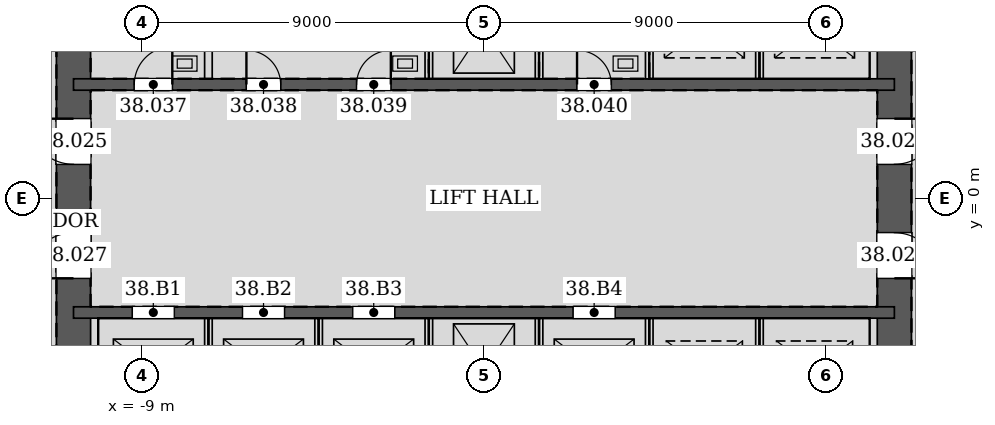
"""IFC4 building model, lengths in metres.
Left out: names, types, materials, properties, quantities, classifications, styles, units other than length and angle.
Written with IfcOpenShell. Run it as: python <this file> out.ifc"""

import sys

from ifc_helpers import new_model, si_unit, direction, frame, frame_2d, origin, place, context, subcontext, project, spatial, rectangle, extrude, element, fill, save


model = new_model("IFC4")
c1 = context("Model", 3, precision=1e-05, world=origin(), true_north=direction((0.0, 1.0)))
c2 = subcontext(c1, "Body", "Model", "MODEL_VIEW")
j1 = project(units=[si_unit("LENGTHUNIT", "METRE"), si_unit("PLANEANGLEUNIT", "RADIAN")], contexts=[c1])
p1 = place(None, origin())
s1 = spatial("IfcSite", under=j1, at=p1, CompositionType="ELEMENT")
p2 = place(p1, origin())
s2 = spatial("IfcBuilding", under=s1, at=p2, CompositionType="ELEMENT")
p3 = place(p2, frame((0.0, 0.0, 168.0)))
s3 = spatial("IfcBuildingStorey", under=s2, at=p3, CompositionType="ELEMENT", Elevation=168.0)
p4 = place(p3, frame((10.8, -10.8, 0.0), z_axis=(0.0, 0.0, 1.0), x_axis=(0.0, 1.0, 0.0)))
e1 = element("IfcWall", 1, at=p4, inside=s3, PredefinedType="SOLIDWALL", context=c2, shape_type="SweptSolid", body=[
    extrude(rectangle(XDim=21.6, YDim=0.9, at=frame_2d((10.8, 0.0))), origin(), (0.0, 0.0, 1.0), 4.2),
])
p5 = place(p4, frame((11.7, 0.0, 0.0)))
e2 = element("IfcOpeningElement", 2, at=p5, cuts=e1, PredefinedType="OPENING", context=c2, shape_type="SweptSolid", body=[
    extrude(rectangle(XDim=1.2, YDim=2.1, at=frame_2d((0.6, 1.05))), frame((0.0, 0.46, 0.0), z_axis=(0.0, -1.0, 0.0), x_axis=(1.0, 0.0, 0.0)), (0.0, 0.0, 1.0), 0.92),
])
p6 = place(p4, frame((8.7, 0.0, 0.0)))
e3 = element("IfcOpeningElement", 3, at=p6, cuts=e1, PredefinedType="OPENING", context=c2, shape_type="SweptSolid", body=[
    extrude(rectangle(XDim=1.2, YDim=2.1, at=frame_2d((0.6, 1.05))), frame((0.0, 0.46, 0.0), z_axis=(0.0, -1.0, 0.0), x_axis=(1.0, 0.0, 0.0)), (0.0, 0.0, 1.0), 0.92),
])
p7 = place(p3, frame((-10.8, 10.8, 0.0), z_axis=(0.0, 0.0, 1.0), x_axis=(0.0, -1.0, 0.0)))
e4 = element("IfcWall", 4, at=p7, inside=s3, PredefinedType="SOLIDWALL", context=c2, shape_type="SweptSolid", body=[
    extrude(rectangle(XDim=21.6, YDim=0.9, at=frame_2d((10.8, 0.0))), origin(), (0.0, 0.0, 1.0), 4.2),
])
p8 = place(p7, frame((8.7, 0.0, 0.0)))
e5 = element("IfcOpeningElement", 5, at=p8, cuts=e4, PredefinedType="OPENING", context=c2, shape_type="SweptSolid", body=[
    extrude(rectangle(XDim=1.2, YDim=2.1, at=frame_2d((0.6, 1.05))), frame((0.0, 0.46, 0.0), z_axis=(0.0, -1.0, 0.0), x_axis=(1.0, 0.0, 0.0)), (0.0, 0.0, 1.0), 0.92),
])
p9 = place(p7, frame((11.7, 0.0, 0.0)))
e6 = element("IfcOpeningElement", 6, at=p9, cuts=e4, PredefinedType="OPENING", context=c2, shape_type="SweptSolid", body=[
    extrude(rectangle(XDim=1.2, YDim=2.1, at=frame_2d((0.6, 1.05))), frame((0.0, 0.46, 0.0), z_axis=(0.0, -1.0, 0.0), x_axis=(1.0, 0.0, 0.0)), (0.0, 0.0, 1.0), 0.92),
])
p10 = place(p3, frame((-10.8, 3.0, 0.0), z_axis=(0.0, 0.0, 1.0), x_axis=(1.0, 0.0, 0.0)))
e7 = element("IfcWall", 7, at=p10, inside=s3, PredefinedType="SOLIDWALL", context=c2, shape_type="SweptSolid", body=[
    extrude(rectangle(XDim=21.6, YDim=0.3, at=frame_2d((10.8, 0.0))), origin(), (0.0, 0.0, 1.0), 4.2),
])
p11 = place(p10, frame((1.6, 0.0, 0.0)))
e8 = element("IfcOpeningElement", 8, at=p11, cuts=e7, PredefinedType="OPENING", context=c2, shape_type="SweptSolid", body=[
    extrude(rectangle(XDim=1.0, YDim=2.1, at=frame_2d((0.5, 1.05))), frame((0.0, 0.16, 0.0), z_axis=(0.0, -1.0, 0.0), x_axis=(1.0, 0.0, 0.0)), (0.0, 0.0, 1.0), 0.32),
])
p12 = place(p10, frame((4.55, 0.0, 0.0)))
e9 = element("IfcOpeningElement", 9, at=p12, cuts=e7, PredefinedType="OPENING", context=c2, shape_type="SweptSolid", body=[
    extrude(rectangle(XDim=0.9, YDim=2.1, at=frame_2d((0.45, 1.05))), frame((0.0, 0.16, 0.0), z_axis=(0.0, -1.0, 0.0), x_axis=(1.0, 0.0, 0.0)), (0.0, 0.0, 1.0), 0.32),
])
p13 = place(p10, frame((7.45, 0.0, 0.0)))
e10 = element("IfcOpeningElement", 10, at=p13, cuts=e7, PredefinedType="OPENING", context=c2, shape_type="SweptSolid", body=[
    extrude(rectangle(XDim=0.9, YDim=2.1, at=frame_2d((0.45, 1.05))), frame((0.0, 0.16, 0.0), z_axis=(0.0, -1.0, 0.0), x_axis=(1.0, 0.0, 0.0)), (0.0, 0.0, 1.0), 0.32),
])
p14 = place(p10, frame((13.25, 0.0, 0.0)))
e11 = element("IfcOpeningElement", 11, at=p14, cuts=e7, PredefinedType="OPENING", context=c2, shape_type="SweptSolid", body=[
    extrude(rectangle(XDim=0.9, YDim=2.1, at=frame_2d((0.45, 1.05))), frame((0.0, 0.16, 0.0), z_axis=(0.0, -1.0, 0.0), x_axis=(1.0, 0.0, 0.0)), (0.0, 0.0, 1.0), 0.32),
])
p15 = place(p3, frame((-10.8, -3.0, 0.0), z_axis=(0.0, 0.0, 1.0), x_axis=(1.0, 0.0, 0.0)))
e12 = element("IfcWall", 12, at=p15, inside=s3, PredefinedType="SOLIDWALL", context=c2, shape_type="SweptSolid", body=[
    extrude(rectangle(XDim=21.6, YDim=0.3, at=frame_2d((10.8, 0.0))), origin(), (0.0, 0.0, 1.0), 4.2),
])
p16 = place(p15, frame((1.55, 0.0, 0.0)))
e13 = element("IfcOpeningElement", 13, at=p16, cuts=e12, PredefinedType="OPENING", context=c2, shape_type="SweptSolid", body=[
    extrude(rectangle(XDim=1.1, YDim=2.1, at=frame_2d((0.55, 1.05))), frame((0.0, 0.16, 0.0), z_axis=(0.0, -1.0, 0.0), x_axis=(1.0, 0.0, 0.0)), (0.0, 0.0, 1.0), 0.32),
])
p17 = place(p15, frame((4.45, 0.0, 0.0)))
e14 = element("IfcOpeningElement", 14, at=p17, cuts=e12, PredefinedType="OPENING", context=c2, shape_type="SweptSolid", body=[
    extrude(rectangle(XDim=1.1, YDim=2.1, at=frame_2d((0.55, 1.05))), frame((0.0, 0.16, 0.0), z_axis=(0.0, -1.0, 0.0), x_axis=(1.0, 0.0, 0.0)), (0.0, 0.0, 1.0), 0.32),
])
p18 = place(p15, frame((7.35, 0.0, 0.0)))
e15 = element("IfcOpeningElement", 15, at=p18, cuts=e12, PredefinedType="OPENING", context=c2, shape_type="SweptSolid", body=[
    extrude(rectangle(XDim=1.1, YDim=2.1, at=frame_2d((0.55, 1.05))), frame((0.0, 0.16, 0.0), z_axis=(0.0, -1.0, 0.0), x_axis=(1.0, 0.0, 0.0)), (0.0, 0.0, 1.0), 0.32),
])
p19 = place(p15, frame((13.15, 0.0, 0.0)))
e16 = element("IfcOpeningElement", 16, at=p19, cuts=e12, PredefinedType="OPENING", context=c2, shape_type="SweptSolid", body=[
    extrude(rectangle(XDim=1.1, YDim=2.1, at=frame_2d((0.55, 1.05))), frame((0.0, 0.16, 0.0), z_axis=(0.0, -1.0, 0.0), x_axis=(1.0, 0.0, 0.0)), (0.0, 0.0, 1.0), 0.32),
])
for number, where, z_axis, x_axis in (
    (17, (-7.25, 3.15, 0.0), (0.0, 0.0, 1.0), (0.0, 1.0, 0.0)),
    (18, (-1.45, 3.15, 0.0), (0.0, 0.0, 1.0), (0.0, 1.0, 0.0)),
    (19, (1.45, 3.15, 0.0), (0.0, 0.0, 1.0), (0.0, 1.0, 0.0)),
    (20, (4.35, 3.15, 0.0), (0.0, 0.0, 1.0), (0.0, 1.0, 0.0)),
):
    element("IfcWall", number, at=place(p3, frame(where, z_axis=z_axis, x_axis=x_axis)), inside=s3, PredefinedType="PARTITIONING", context=c2, shape_type="SweptSolid", body=[
        extrude(rectangle(XDim=2.7, YDim=0.2, at=frame_2d((1.35, 0.0))), origin(), (0.0, 0.0, 1.0), 4.035),
    ])
for number, where, z_axis, x_axis in (
    (21, (7.25, 3.15, 0.0), (0.0, 0.0, 1.0), (0.0, 1.0, 0.0)),
    (22, (-7.25, -5.85, 0.0), (0.0, 0.0, 1.0), (0.0, 1.0, 0.0)),
    (23, (-4.35, -5.85, 0.0), (0.0, 0.0, 1.0), (0.0, 1.0, 0.0)),
    (24, (-1.45, -5.85, 0.0), (0.0, 0.0, 1.0), (0.0, 1.0, 0.0)),
    (25, (1.45, -5.85, 0.0), (0.0, 0.0, 1.0), (0.0, 1.0, 0.0)),
    (26, (4.35, -5.85, 0.0), (0.0, 0.0, 1.0), (0.0, 1.0, 0.0)),
    (27, (7.25, -5.85, 0.0), (0.0, 0.0, 1.0), (0.0, 1.0, 0.0)),
):
    element("IfcWall", number, at=place(p3, frame(where, z_axis=z_axis, x_axis=x_axis)), inside=s3, PredefinedType="PARTITIONING", context=c2, shape_type="SweptSolid", body=[
        extrude(rectangle(XDim=2.7, YDim=0.2, at=frame_2d((1.35, 0.0))), origin(), (0.0, 0.0, 1.0), 4.2),
    ])
p20 = place(p5, frame((1.2, 0.0, 0.0), z_axis=(0.0, 0.0, 1.0), x_axis=(-1.0, 0.0, 0.0)))
e28 = element("IfcDoor", 28, at=p20, inside=s3, OperationType="SINGLE_SWING_LEFT", PredefinedType="DOOR", context=c2, shape_type="SweptSolid", body=[
    extrude(rectangle(XDim=1.2, YDim=2.1, at=frame_2d((0.6, 1.05))), frame((0.0, 0.025, 0.0), z_axis=(0.0, -1.0, 0.0), x_axis=(1.0, 0.0, 0.0)), (0.0, 0.0, 1.0), 0.05),
])
fill(e2, e28)
p21 = place(p8, frame((1.2, 0.0, 0.0), z_axis=(0.0, 0.0, 1.0), x_axis=(-1.0, 0.0, 0.0)))
e29 = element("IfcDoor", 29, at=p21, inside=s3, OperationType="SINGLE_SWING_RIGHT", PredefinedType="DOOR", context=c2, shape_type="SweptSolid", body=[
    extrude(rectangle(XDim=1.2, YDim=2.1, at=frame_2d((0.6, 1.05))), frame((0.0, 0.025, 0.0), z_axis=(0.0, -1.0, 0.0), x_axis=(1.0, 0.0, 0.0)), (0.0, 0.0, 1.0), 0.05),
])
fill(e5, e29)
p22 = place(p6, frame((1.2, 0.0, 0.0), z_axis=(0.0, 0.0, 1.0), x_axis=(-1.0, 0.0, 0.0)))
e30 = element("IfcDoor", 30, at=p22, inside=s3, OperationType="SINGLE_SWING_RIGHT", PredefinedType="DOOR", context=c2, shape_type="SweptSolid", body=[
    extrude(rectangle(XDim=1.2, YDim=2.1, at=frame_2d((0.6, 1.05))), frame((0.0, 0.025, 0.0), z_axis=(0.0, -1.0, 0.0), x_axis=(1.0, 0.0, 0.0)), (0.0, 0.0, 1.0), 0.05),
])
fill(e3, e30)
p23 = place(p9, frame((1.2, 0.0, 0.0), z_axis=(0.0, 0.0, 1.0), x_axis=(-1.0, 0.0, 0.0)))
e31 = element("IfcDoor", 31, at=p23, inside=s3, OperationType="SINGLE_SWING_LEFT", PredefinedType="DOOR", context=c2, shape_type="SweptSolid", body=[
    extrude(rectangle(XDim=1.2, YDim=2.1, at=frame_2d((0.6, 1.05))), frame((0.0, 0.025, 0.0), z_axis=(0.0, -1.0, 0.0), x_axis=(1.0, 0.0, 0.0)), (0.0, 0.0, 1.0), 0.05),
])
fill(e6, e31)
p24 = place(p11, origin())
e32 = element("IfcDoor", 32, at=p24, inside=s3, OperationType="SINGLE_SWING_RIGHT", PredefinedType="DOOR", context=c2, shape_type="SweptSolid", body=[
    extrude(rectangle(XDim=1.0, YDim=2.1, at=frame_2d((0.5, 1.05))), frame((0.0, 0.025, 0.0), z_axis=(0.0, -1.0, 0.0), x_axis=(1.0, 0.0, 0.0)), (0.0, 0.0, 1.0), 0.05),
])
fill(e8, e32)
p25 = place(p12, origin())
e33 = element("IfcDoor", 33, at=p25, inside=s3, OperationType="SINGLE_SWING_LEFT", PredefinedType="DOOR", context=c2, shape_type="SweptSolid", body=[
    extrude(rectangle(XDim=0.9, YDim=2.1, at=frame_2d((0.45, 1.05))), frame((0.0, 0.025, 0.0), z_axis=(0.0, -1.0, 0.0), x_axis=(1.0, 0.0, 0.0)), (0.0, 0.0, 1.0), 0.05),
])
fill(e9, e33)
p26 = place(p13, origin())
e34 = element("IfcDoor", 34, at=p26, inside=s3, OperationType="SINGLE_SWING_RIGHT", PredefinedType="DOOR", context=c2, shape_type="SweptSolid", body=[
    extrude(rectangle(XDim=0.9, YDim=2.1, at=frame_2d((0.45, 1.05))), frame((0.0, 0.025, 0.0), z_axis=(0.0, -1.0, 0.0), x_axis=(1.0, 0.0, 0.0)), (0.0, 0.0, 1.0), 0.05),
])
fill(e10, e34)
p27 = place(p14, origin())
e35 = element("IfcDoor", 35, at=p27, inside=s3, OperationType="SINGLE_SWING_LEFT", PredefinedType="DOOR", context=c2, shape_type="SweptSolid", body=[
    extrude(rectangle(XDim=0.9, YDim=2.1, at=frame_2d((0.45, 1.05))), frame((0.0, 0.025, 0.0), z_axis=(0.0, -1.0, 0.0), x_axis=(1.0, 0.0, 0.0)), (0.0, 0.0, 1.0), 0.05),
])
fill(e11, e35)
p28 = place(p16, origin())
e36 = element("IfcDoor", 36, at=p28, inside=s3, OperationType="DOUBLE_DOOR_SLIDING", PredefinedType="DOOR", context=c2, shape_type="SweptSolid", body=[
    extrude(rectangle(XDim=1.1, YDim=2.1, at=frame_2d((0.55, 1.05))), frame((0.0, 0.025, 0.0), z_axis=(0.0, -1.0, 0.0), x_axis=(1.0, 0.0, 0.0)), (0.0, 0.0, 1.0), 0.05),
])
fill(e13, e36)
p29 = place(p17, origin())
e37 = element("IfcDoor", 37, at=p29, inside=s3, OperationType="DOUBLE_DOOR_SLIDING", PredefinedType="DOOR", context=c2, shape_type="SweptSolid", body=[
    extrude(rectangle(XDim=1.1, YDim=2.1, at=frame_2d((0.55, 1.05))), frame((0.0, 0.025, 0.0), z_axis=(0.0, -1.0, 0.0), x_axis=(1.0, 0.0, 0.0)), (0.0, 0.0, 1.0), 0.05),
])
fill(e14, e37)
p30 = place(p18, origin())
e38 = element("IfcDoor", 38, at=p30, inside=s3, OperationType="DOUBLE_DOOR_SLIDING", PredefinedType="DOOR", context=c2, shape_type="SweptSolid", body=[
    extrude(rectangle(XDim=1.1, YDim=2.1, at=frame_2d((0.55, 1.05))), frame((0.0, 0.025, 0.0), z_axis=(0.0, -1.0, 0.0), x_axis=(1.0, 0.0, 0.0)), (0.0, 0.0, 1.0), 0.05),
])
fill(e15, e38)
p31 = place(p19, origin())
e39 = element("IfcDoor", 39, at=p31, inside=s3, OperationType="DOUBLE_DOOR_SLIDING", PredefinedType="DOOR", context=c2, shape_type="SweptSolid", body=[
    extrude(rectangle(XDim=1.1, YDim=2.1, at=frame_2d((0.55, 1.05))), frame((0.0, 0.025, 0.0), z_axis=(0.0, -1.0, 0.0), x_axis=(1.0, 0.0, 0.0)), (0.0, 0.0, 1.0), 0.05),
])
fill(e16, e39)
save(model, sys.argv[1])
